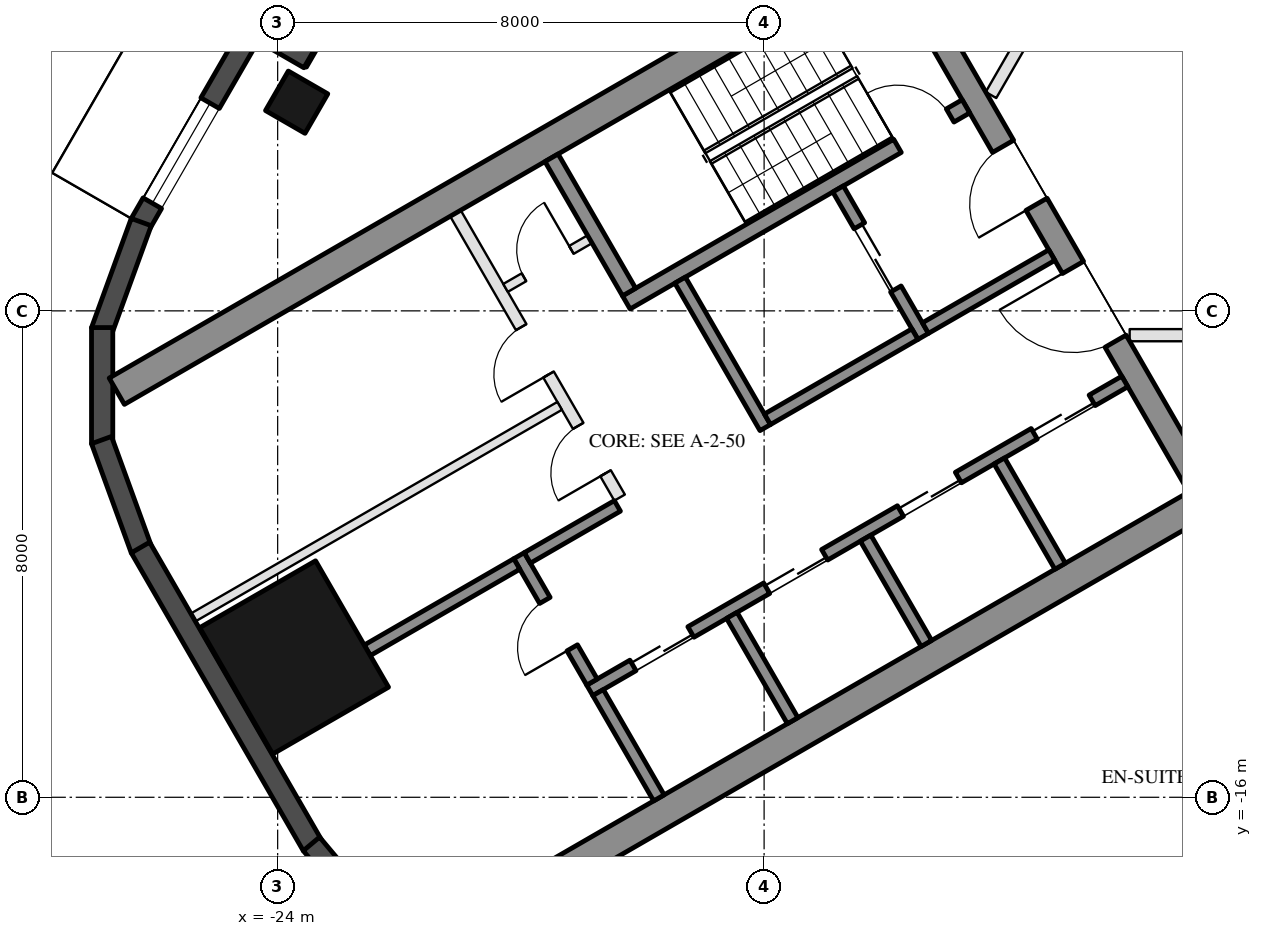
"""IFC4 building model, lengths in metres.
Left out: names, types, materials, properties, quantities, classifications, styles, units other than length and angle.
Written with IfcOpenShell. Run it as: python <this file> out.ifc"""

import sys

from ifc_helpers import new_model, si_unit, direction, frame, frame_2d, origin, origin_2d, place, context, subcontext, project, spatial, rectangle, hollow_rectangle, extrude, element, fill, save


model = new_model("IFC4")
c1 = context("Model", 3, precision=1e-05, world=origin(), true_north=direction((0.0, 1.0)))
c2 = subcontext(c1, "Body", "Model", "MODEL_VIEW")
j1 = project(units=[si_unit("LENGTHUNIT", "METRE"), si_unit("PLANEANGLEUNIT", "RADIAN")], contexts=[c1])
p1 = place(None, origin())
s1 = spatial("IfcSite", under=j1, at=p1, CompositionType="ELEMENT")
p2 = place(p1, origin())
s2 = spatial("IfcBuilding", under=s1, at=p2, CompositionType="ELEMENT")
p3 = place(p2, frame((0.0, 0.0, 216.9)))
s3 = spatial("IfcBuildingStorey", under=s2, at=p3, CompositionType="ELEMENT", Elevation=216.9)
p4 = place(p3, frame((-23.688, -4.568, 0.0), z_axis=(0.0, 0.0, 1.0), x_axis=(0.5, 0.866025403784, 0.0)))
e1 = element("IfcColumn", 1, at=p4, inside=s3, PredefinedType="COLUMN", context=c2, shape_type="SweptSolid", body=[
    extrude(hollow_rectangle(XDim=0.75, YDim=0.75, WallThickness=0.035, at=origin_2d()), origin(), (0.0, 0.0, 1.0), 3.7),
])
p5 = place(p3, frame((-23.729, -13.7, 0.0), z_axis=(0.0, 0.0, 1.0), x_axis=(-0.5, 0.866025403784, 0.0)))
e2 = element("IfcColumn", 2, at=p5, inside=s3, PredefinedType="COLUMN", context=c2, shape_type="SweptSolid", body=[
    extrude(hollow_rectangle(XDim=2.4, YDim=2.2, WallThickness=0.06, at=origin_2d()), origin(), (0.0, 0.0, 1.0), 3.7),
])
p6 = place(p3, frame((-20.309, 1.934, 0.0), z_axis=(0.0, 0.0, 1.0), x_axis=(-0.499992114976, -0.866029956157, 0.0)))
e3 = element("IfcWall", 3, at=p6, inside=s3, PredefinedType="SOLIDWALL", context=c2, shape_type="SweptSolid", body=[
    extrude(rectangle(XDim=6.74, YDim=0.35, at=frame_2d((3.37, 0.0))), origin(), (0.0, 0.0, 1.0), 3.55),
])
p7 = place(p6, frame((0.77, 0.0, 0.0)))
e4 = element("IfcOpeningElement", 4, at=p7, cuts=e3, PredefinedType="OPENING", context=c2, shape_type="SweptSolid", body=[
    extrude(rectangle(XDim=2.4, YDim=2.4, at=frame_2d((1.2, 1.2))), frame((0.0, 0.185, 0.0), z_axis=(0.0, -1.0, 0.0), x_axis=(1.0, 0.0, 0.0)), (0.0, 0.0, 1.0), 0.37),
])
p8 = place(p6, frame((3.47, 0.0, 0.3)))
e5 = element("IfcOpeningElement", 5, at=p8, cuts=e3, PredefinedType="OPENING", context=c2, shape_type="SweptSolid", body=[
    extrude(rectangle(XDim=2.9, YDim=2.65, at=frame_2d((1.45, 1.325))), frame((0.0, 0.185, 0.0), z_axis=(0.0, -1.0, 0.0), x_axis=(1.0, 0.0, 0.0)), (0.0, 0.0, 1.0), 0.37),
])
p9 = place(p3, frame((-23.481, -3.85, 0.0), z_axis=(0.0, 0.0, 1.0), x_axis=(-0.866092288191, 0.499884134912, 0.0)))
e6 = element("IfcWall", 6, at=p9, inside=s3, PredefinedType="SOLIDWALL", context=c2, shape_type="SweptSolid", body=[
    extrude(rectangle(XDim=1.22, YDim=0.35, at=frame_2d((0.61, 0.0))), origin(), (0.0, 0.0, 1.0), 3.55),
])
p10 = place(p3, frame((-24.299, -3.176, 0.0), z_axis=(0.0, 0.0, 1.0), x_axis=(-0.500028278809, -0.866009076391, 0.0)))
e7 = element("IfcWall", 7, at=p10, inside=s3, PredefinedType="SOLIDWALL", context=c2, shape_type="SweptSolid", body=[
    extrude(rectangle(XDim=3.916, YDim=0.35, at=frame_2d((1.958, 0.0))), origin(), (0.0, 0.0, 1.0), 3.55),
])
p11 = place(p10, frame((1.625, 0.0, 0.3)))
e8 = element("IfcOpeningElement", 8, at=p11, cuts=e7, PredefinedType="OPENING", context=c2, shape_type="SweptSolid", body=[
    extrude(rectangle(XDim=1.9, YDim=2.65, at=frame_2d((0.95, 1.325))), frame((0.0, 0.185, 0.0), z_axis=(0.0, -1.0, 0.0), x_axis=(1.0, 0.0, 0.0)), (0.0, 0.0, 1.0), 0.37),
])
for number, where, z_axis, x_axis in (
    (9, (-26.244, -6.54, 0.0), (0.0, 0.0, 1.0), (-0.342, -0.94, 0.0)),
    (10, (-26.886, -8.275, 0.0), (0.0, 0.0, 1.0), (0.0, -1.0, 0.0)),
    (11, (-26.897, -10.125, 0.0), (0.0, 0.0, 1.0), (0.342, -0.94, 0.0)),
):
    element("IfcWall", number, at=place(p3, frame(where, z_axis=z_axis, x_axis=x_axis)), inside=s3, PredefinedType="SOLIDWALL", context=c2, shape_type="SweptSolid", body=[
        extrude(rectangle(XDim=1.91, YDim=0.35, at=frame_2d((0.955, 0.0))), origin(), (0.0, 0.0, 1.0), 3.55),
    ])
p12 = place(p3, frame((-26.257, -11.893, 0.0), z_axis=(0.0, 0.0, 1.0), x_axis=(0.500018773155, -0.866014564827, 0.0)))
e12 = element("IfcWall", 12, at=p12, inside=s3, PredefinedType="SOLIDWALL", context=c2, shape_type="SweptSolid", body=[
    extrude(rectangle(XDim=5.658, YDim=0.35, at=frame_2d((2.829, 0.0))), origin(), (0.0, 0.0, 1.0), 3.55),
])
p13 = place(p3, frame((-23.445, -16.768, 0.0), z_axis=(0.0, 0.0, 1.0), x_axis=(0.642733291068, -0.76609001857, 0.0)))
e13 = element("IfcWall", 13, at=p13, inside=s3, PredefinedType="SOLIDWALL", context=c2, shape_type="SweptSolid", body=[
    extrude(rectangle(XDim=1.91, YDim=0.35, at=frame_2d((0.955, 0.0))), origin(), (0.0, 0.0, 1.0), 3.55),
])
for number, where, z_axis, x_axis in (
    (14, (-13.797, -1.903, 0.0), (0.0, 0.0, 1.0), (-0.866, -0.5, 0.0)),
    (15, (-8.547, -10.997, 0.0), (0.0, 0.0, 1.0), (-0.866, -0.5, 0.0)),
):
    element("IfcWall", number, at=place(p3, frame(where, z_axis=z_axis, x_axis=x_axis)), inside=s3, PredefinedType="SHEAR", context=c2, shape_type="SweptSolid", body=[
        extrude(rectangle(XDim=14.837, YDim=0.5, at=frame_2d((7.418, 0.0))), origin(), (0.0, 0.0, 1.0), 3.5),
    ])
p14 = place(p3, frame((-13.845, -2.22, 0.0), z_axis=(0.0, 0.0, 1.0), x_axis=(0.500004234368, -0.866022959057, 0.0)))
e16 = element("IfcWall", 16, at=p14, inside=s3, PredefinedType="SHEAR", context=c2, shape_type="SweptSolid", body=[
    extrude(rectangle(XDim=10.0, YDim=0.4, at=frame_2d((5.0, 0.0))), origin(), (0.0, 0.0, 1.0), 3.5),
])
p15 = place(p14, frame((3.55, 0.0, 0.0)))
e17 = element("IfcOpeningElement", 17, at=p15, cuts=e16, PredefinedType="OPENING", context=c2, shape_type="SweptSolid", body=[
    extrude(rectangle(XDim=1.1, YDim=2.1, at=frame_2d((0.55, 1.05))), frame((0.0, 0.21, 0.0), z_axis=(0.0, -1.0, 0.0), x_axis=(1.0, 0.0, 0.0)), (0.0, 0.0, 1.0), 0.42),
])
p16 = place(p14, frame((5.85, 0.0, 0.0)))
e18 = element("IfcOpeningElement", 18, at=p16, cuts=e16, PredefinedType="OPENING", context=c2, shape_type="SweptSolid", body=[
    extrude(rectangle(XDim=1.4, YDim=2.1, at=frame_2d((0.7, 1.05))), frame((0.0, 0.21, 0.0), z_axis=(0.0, -1.0, 0.0), x_axis=(1.0, 0.0, 0.0)), (0.0, 0.0, 1.0), 0.42),
])
p17 = place(p3, frame((-12.681, -4.636, 0.0), z_axis=(0.0, 0.0, 1.0), x_axis=(-0.866021702275, -0.500006411147, 0.0)))
e19 = element("IfcWall", 19, at=p17, inside=s3, PredefinedType="SHEAR", context=c2, shape_type="SweptSolid", body=[
    extrude(rectangle(XDim=6.45, YDim=0.25, at=frame_2d((3.225, 0.0))), origin(), (0.0, 0.0, 1.0), 3.5),
])
p18 = place(p17, frame((0.3, 0.0, 0.0)))
e20 = element("IfcOpeningElement", 20, at=p18, cuts=e19, PredefinedType="OPENING", context=c2, shape_type="SweptSolid", body=[
    extrude(rectangle(XDim=1.0, YDim=2.1, at=frame_2d((0.5, 1.05))), frame((0.0, 0.135, 0.0), z_axis=(0.0, -1.0, 0.0), x_axis=(1.0, 0.0, 0.0)), (0.0, 0.0, 1.0), 0.27),
])
p19 = place(p3, frame((-19.496, -5.482, 0.0), z_axis=(0.0, 0.0, 1.0), x_axis=(0.499990435942, -0.866030925526, 0.0)))
e21 = element("IfcWall", 21, at=p19, inside=s3, PredefinedType="SHEAR", context=c2, shape_type="SweptSolid", body=[
    extrude(rectangle(XDim=2.55, YDim=0.25, at=frame_2d((1.275, 0.0))), origin(), (0.0, 0.0, 1.0), 3.5),
])
p20 = place(p3, frame((-17.381, -7.495, 0.0), z_axis=(0.0, 0.0, 1.0), x_axis=(0.500011755427, -0.866018616679, 0.0)))
e22 = element("IfcWall", 22, at=p20, inside=s3, PredefinedType="SHEAR", context=c2, shape_type="SweptSolid", body=[
    extrude(rectangle(XDim=2.8, YDim=0.2, at=frame_2d((1.4, 0.0))), origin(), (0.0, 0.0, 1.0), 3.5),
])
p21 = place(p3, frame((-14.783, -5.995, 0.0), z_axis=(0.0, 0.0, 1.0), x_axis=(0.49994636267, -0.866056369097, 0.0)))
e23 = element("IfcWall", 23, at=p21, inside=s3, PredefinedType="SHEAR", context=c2, shape_type="SweptSolid", body=[
    extrude(rectangle(XDim=2.8, YDim=0.2, at=frame_2d((1.4, 0.0))), origin(), (0.0, 0.0, 1.0), 3.5),
])
p22 = place(p21, frame((0.7, 0.0, 0.0)))
e24 = element("IfcOpeningElement", 24, at=p22, cuts=e23, PredefinedType="OPENING", context=c2, shape_type="SweptSolid", body=[
    extrude(rectangle(XDim=1.2, YDim=2.1, at=frame_2d((0.6, 1.05))), frame((0.0, 0.11, 0.0), z_axis=(0.0, -1.0, 0.0), x_axis=(1.0, 0.0, 0.0)), (0.0, 0.0, 1.0), 0.22),
])
p23 = place(p3, frame((-13.52, -8.383, 0.0), z_axis=(0.0, 0.0, 1.0), x_axis=(-0.866034573852, -0.49998411664, 0.0)))
e25 = element("IfcWall", 25, at=p23, inside=s3, PredefinedType="SHEAR", context=c2, shape_type="SweptSolid", body=[
    extrude(rectangle(XDim=2.8, YDim=0.2, at=frame_2d((1.4, 0.0))), origin(), (0.0, 0.0, 1.0), 3.5),
])
p24 = place(p3, frame((-11.268, -7.083, 0.0), z_axis=(0.0, 0.0, 1.0), x_axis=(-0.866050077142, -0.499957262057, 0.0)))
e26 = element("IfcWall", 26, at=p24, inside=s3, PredefinedType="SHEAR", context=c2, shape_type="SweptSolid", body=[
    extrude(rectangle(XDim=2.4, YDim=0.2, at=frame_2d((1.2, 0.0))), origin(), (0.0, 0.0, 1.0), 3.5),
])
p25 = place(p3, frame((-10.068, -9.162, 0.0), z_axis=(0.0, 0.0, 1.0), x_axis=(-0.866032725843, -0.499987317609, 0.0)))
e27 = element("IfcWall", 27, at=p25, inside=s3, PredefinedType="SHEAR", context=c2, shape_type="SweptSolid", body=[
    extrude(rectangle(XDim=10.16, YDim=0.2, at=frame_2d((5.08, 0.0))), origin(), (0.0, 0.0, 1.0), 3.5),
])
p26 = place(p25, frame((0.62, 0.0, 0.0)))
e28 = element("IfcOpeningElement", 28, at=p26, cuts=e27, PredefinedType="OPENING", context=c2, shape_type="SweptSolid", body=[
    extrude(rectangle(XDim=1.1, YDim=2.1, at=frame_2d((0.55, 1.05))), frame((0.0, 0.11, 0.0), z_axis=(0.0, -1.0, 0.0), x_axis=(1.0, 0.0, 0.0)), (0.0, 0.0, 1.0), 0.22),
])
p27 = place(p25, frame((3.16, 0.0, 0.0)))
e29 = element("IfcOpeningElement", 29, at=p27, cuts=e27, PredefinedType="OPENING", context=c2, shape_type="SweptSolid", body=[
    extrude(rectangle(XDim=1.1, YDim=2.1, at=frame_2d((0.55, 1.05))), frame((0.0, 0.11, 0.0), z_axis=(0.0, -1.0, 0.0), x_axis=(1.0, 0.0, 0.0)), (0.0, 0.0, 1.0), 0.22),
])
p28 = place(p25, frame((5.7, 0.0, 0.0)))
e30 = element("IfcOpeningElement", 30, at=p28, cuts=e27, PredefinedType="OPENING", context=c2, shape_type="SweptSolid", body=[
    extrude(rectangle(XDim=1.1, YDim=2.1, at=frame_2d((0.55, 1.05))), frame((0.0, 0.11, 0.0), z_axis=(0.0, -1.0, 0.0), x_axis=(1.0, 0.0, 0.0)), (0.0, 0.0, 1.0), 0.22),
])
p29 = place(p25, frame((8.24, 0.0, 0.0)))
e31 = element("IfcOpeningElement", 31, at=p29, cuts=e27, PredefinedType="OPENING", context=c2, shape_type="SweptSolid", body=[
    extrude(rectangle(XDim=1.1, YDim=2.1, at=frame_2d((0.55, 1.05))), frame((0.0, 0.11, 0.0), z_axis=(0.0, -1.0, 0.0), x_axis=(1.0, 0.0, 0.0)), (0.0, 0.0, 1.0), 0.22),
])
p30 = place(p3, frame((-20.031, -12.026, 0.0), z_axis=(0.0, 0.0, 1.0), x_axis=(0.500033551112, -0.866006032174, 0.0)))
e32 = element("IfcWall", 32, at=p30, inside=s3, PredefinedType="SHEAR", context=c2, shape_type="SweptSolid", body=[
    extrude(rectangle(XDim=2.4, YDim=0.2, at=frame_2d((1.2, 0.0))), origin(), (0.0, 0.0, 1.0), 3.5),
])
p31 = place(p30, frame((0.85, 0.0, 0.0)))
e33 = element("IfcOpeningElement", 33, at=p31, cuts=e32, PredefinedType="OPENING", context=c2, shape_type="SweptSolid", body=[
    extrude(rectangle(XDim=0.9, YDim=2.1, at=frame_2d((0.45, 1.05))), frame((0.0, 0.11, 0.0), z_axis=(0.0, -1.0, 0.0), x_axis=(1.0, 0.0, 0.0)), (0.0, 0.0, 1.0), 0.22),
])
p32 = place(p3, frame((-18.413, -11.208, 0.0), z_axis=(0.0, 0.0, 1.0), x_axis=(-0.866038183914, -0.499977863513, 0.0)))
e34 = element("IfcWall", 34, at=p32, inside=s3, PredefinedType="SHEAR", context=c2, shape_type="SweptSolid", body=[
    extrude(rectangle(XDim=1.71, YDim=0.2, at=frame_2d((0.855, 0.0))), origin(), (0.0, 0.0, 1.0), 3.5),
])
for number, where, z_axis, x_axis in (
    (35, (-12.131, -10.468, 0.0), (0.0, 0.0, 1.0), (0.5, -0.866, 0.0)),
    (36, (-14.331, -11.738, 0.0), (0.0, 0.0, 1.0), (0.5, -0.866, 0.0)),
    (37, (-16.531, -13.008, 0.0), (0.0, 0.0, 1.0), (0.5, -0.866, 0.0)),
    (38, (-18.73, -14.278, 0.0), (0.0, 0.0, 1.0), (0.5, -0.866, 0.0)),
):
    element("IfcWall", number, at=place(p3, frame(where, z_axis=z_axis, x_axis=x_axis)), inside=s3, PredefinedType="SHEAR", context=c2, shape_type="SweptSolid", body=[
        extrude(rectangle(XDim=2.0, YDim=0.2, at=frame_2d((1.0, 0.0))), origin(), (0.0, 0.0, 1.0), 3.5),
    ])
p33 = place(p3, frame((-20.067, -12.163, 0.0), z_axis=(0.0, 0.0, 1.0), x_axis=(-0.866055327414, -0.49994816717, 0.0)))
e39 = element("IfcWall", 39, at=p33, inside=s3, PredefinedType="SHEAR", context=c2, shape_type="SweptSolid", body=[
    extrude(rectangle(XDim=2.84, YDim=0.2, at=frame_2d((1.42, 0.0))), origin(), (0.0, 0.0, 1.0), 3.5),
])
p34 = place(p3, frame((-21.076, -6.395, 0.0), z_axis=(0.0, 0.0, 1.0), x_axis=(0.50001468107, -0.866016927499, 0.0)))
e40 = element("IfcWall", 40, at=p34, inside=s3, PredefinedType="PARTITIONING", context=c2, shape_type="SweptSolid", body=[
    extrude(rectangle(XDim=5.4, YDim=0.2, at=frame_2d((2.7, 0.0))), origin(), (0.0, 0.0, 1.0), 3.5),
])
p35 = place(p34, frame((2.163, 0.0, 0.0)))
e41 = element("IfcOpeningElement", 41, at=p35, cuts=e40, PredefinedType="OPENING", context=c2, shape_type="SweptSolid", body=[
    extrude(rectangle(XDim=0.9, YDim=2.1, at=frame_2d((0.45, 1.05))), frame((0.0, 0.11, 0.0), z_axis=(0.0, -1.0, 0.0), x_axis=(1.0, 0.0, 0.0)), (0.0, 0.0, 1.0), 0.22),
])
p36 = place(p34, frame((4.038, 0.0, 0.0)))
e42 = element("IfcOpeningElement", 42, at=p36, cuts=e40, PredefinedType="OPENING", context=c2, shape_type="SweptSolid", body=[
    extrude(rectangle(XDim=0.9, YDim=2.1, at=frame_2d((0.45, 1.05))), frame((0.0, 0.11, 0.0), z_axis=(0.0, -1.0, 0.0), x_axis=(1.0, 0.0, 0.0)), (0.0, 0.0, 1.0), 0.22),
])
p37 = place(p3, frame((-18.866, -6.822, 0.0), z_axis=(0.0, 0.0, 1.0), x_axis=(-0.866028054938, -0.499995408039, 0.0)))
e43 = element("IfcWall", 43, at=p37, inside=s3, PredefinedType="PARTITIONING", context=c2, shape_type="SweptSolid", body=[
    extrude(rectangle(XDim=1.6, YDim=0.15, at=frame_2d((0.8, 0.0))), origin(), (0.0, 0.0, 1.0), 3.5),
])
p38 = place(p37, frame((0.35, 0.0, 0.0)))
e44 = element("IfcOpeningElement", 44, at=p38, cuts=e43, PredefinedType="OPENING", context=c2, shape_type="SweptSolid", body=[
    extrude(rectangle(XDim=0.9, YDim=2.1, at=frame_2d((0.45, 1.05))), frame((0.0, 0.085, 0.0), z_axis=(0.0, -1.0, 0.0), x_axis=(1.0, 0.0, 0.0)), (0.0, 0.0, 1.0), 0.17),
])
p39 = place(p3, frame((-19.363, -9.562, 0.0), z_axis=(0.0, 0.0, 1.0), x_axis=(-0.866016523273, -0.500015381182, 0.0)))
e45 = element("IfcWall", 45, at=p39, inside=s3, PredefinedType="PARTITIONING", context=c2, shape_type="SweptSolid", body=[
    extrude(rectangle(XDim=6.95, YDim=0.15, at=frame_2d((3.475, 0.0))), origin(), (0.0, 0.0, 1.0), 3.5),
])
p40 = place(p3, frame((-6.2, -8.4, 0.0), z_axis=(0.0, 0.0, 1.0), x_axis=(-1.0, 0.0, 0.0)))
e46 = element("IfcWall", 46, at=p40, inside=s3, PredefinedType="PARTITIONING", context=c2, shape_type="SweptSolid", body=[
    extrude(rectangle(XDim=3.788, YDim=0.2, at=frame_2d((1.894, 0.0))), origin(), (0.0, 0.0, 1.0), 2.95),
])
p41 = place(p40, frame((1.394, 0.0, 0.0)))
e47 = element("IfcOpeningElement", 47, at=p41, cuts=e46, PredefinedType="OPENING", context=c2, shape_type="SweptSolid", body=[
    extrude(rectangle(XDim=1.0, YDim=2.1, at=frame_2d((0.5, 1.05))), frame((0.0, 0.11, 0.0), z_axis=(0.0, -1.0, 0.0), x_axis=(1.0, 0.0, 0.0)), (0.0, 0.0, 1.0), 0.22),
])
p42 = place(p3, frame((-12.269, -4.45, 0.0), z_axis=(0.0, 0.0, 1.0), x_axis=(0.499998569178, 0.866026229868, 0.0)))
e48 = element("IfcWall", 48, at=p42, inside=s3, PredefinedType="PARTITIONING", context=c2, shape_type="SweptSolid", body=[
    extrude(rectangle(XDim=4.388, YDim=0.2, at=frame_2d((2.194, 0.0))), origin(), (0.0, 0.0, 1.0), 2.95),
])
p43 = place(p42, frame((1.694, 0.0, 0.0)))
e49 = element("IfcOpeningElement", 49, at=p43, cuts=e48, PredefinedType="OPENING", context=c2, shape_type="SweptSolid", body=[
    extrude(rectangle(XDim=1.0, YDim=2.1, at=frame_2d((0.5, 1.05))), frame((0.0, 0.11, 0.0), z_axis=(0.0, -1.0, 0.0), x_axis=(1.0, 0.0, 0.0)), (0.0, 0.0, 1.0), 0.22),
])
p44 = place(p11, origin())
e50 = element("IfcWindow", 50, at=p44, inside=s3, PartitioningType="SINGLE_PANEL", PredefinedType="WINDOW", context=c2, shape_type="SweptSolid", body=[
    extrude(rectangle(XDim=1.9, YDim=2.65, at=frame_2d((0.95, 1.325))), frame((0.0, 0.03, 0.0), z_axis=(0.0, -1.0, 0.0), x_axis=(1.0, 0.0, 0.0)), (0.0, 0.0, 1.0), 0.06),
])
fill(e8, e50)
p45 = place(p22, origin())
e51 = element("IfcDoor", 51, at=p45, inside=s3, OperationType="DOUBLE_DOOR_SLIDING", PredefinedType="DOOR", context=c2, shape_type="SweptSolid", body=[
    extrude(rectangle(XDim=1.2, YDim=2.1, at=frame_2d((0.6, 1.05))), frame((0.0, 0.025, 0.0), z_axis=(0.0, -1.0, 0.0), x_axis=(1.0, 0.0, 0.0)), (0.0, 0.0, 1.0), 0.05),
])
fill(e24, e51)
p46 = place(p38, frame((0.9, 0.0, 0.0), z_axis=(0.0, 0.0, 1.0), x_axis=(-1.0, 0.0, 0.0)))
e52 = element("IfcDoor", 52, at=p46, inside=s3, OperationType="SINGLE_SWING_RIGHT", PredefinedType="DOOR", context=c2, shape_type="SweptSolid", body=[
    extrude(rectangle(XDim=0.9, YDim=2.1, at=frame_2d((0.45, 1.05))), frame((0.0, 0.025, 0.0), z_axis=(0.0, -1.0, 0.0), x_axis=(1.0, 0.0, 0.0)), (0.0, 0.0, 1.0), 0.05),
])
fill(e44, e52)
p47 = place(p26, origin())
e53 = element("IfcDoor", 53, at=p47, inside=s3, OperationType="DOUBLE_DOOR_SLIDING", PredefinedType="DOOR", context=c2, shape_type="SweptSolid", body=[
    extrude(rectangle(XDim=1.1, YDim=2.1, at=frame_2d((0.55, 1.05))), frame((0.0, 0.025, 0.0), z_axis=(0.0, -1.0, 0.0), x_axis=(1.0, 0.0, 0.0)), (0.0, 0.0, 1.0), 0.05),
])
fill(e28, e53)
p48 = place(p27, origin())
e54 = element("IfcDoor", 54, at=p48, inside=s3, OperationType="DOUBLE_DOOR_SLIDING", PredefinedType="DOOR", context=c2, shape_type="SweptSolid", body=[
    extrude(rectangle(XDim=1.1, YDim=2.1, at=frame_2d((0.55, 1.05))), frame((0.0, 0.025, 0.0), z_axis=(0.0, -1.0, 0.0), x_axis=(1.0, 0.0, 0.0)), (0.0, 0.0, 1.0), 0.05),
])
fill(e29, e54)
p49 = place(p28, origin())
e55 = element("IfcDoor", 55, at=p49, inside=s3, OperationType="DOUBLE_DOOR_SLIDING", PredefinedType="DOOR", context=c2, shape_type="SweptSolid", body=[
    extrude(rectangle(XDim=1.1, YDim=2.1, at=frame_2d((0.55, 1.05))), frame((0.0, 0.025, 0.0), z_axis=(0.0, -1.0, 0.0), x_axis=(1.0, 0.0, 0.0)), (0.0, 0.0, 1.0), 0.05),
])
fill(e30, e55)
p50 = place(p29, origin())
e56 = element("IfcDoor", 56, at=p50, inside=s3, OperationType="DOUBLE_DOOR_SLIDING", PredefinedType="DOOR", context=c2, shape_type="SweptSolid", body=[
    extrude(rectangle(XDim=1.1, YDim=2.1, at=frame_2d((0.55, 1.05))), frame((0.0, 0.025, 0.0), z_axis=(0.0, -1.0, 0.0), x_axis=(1.0, 0.0, 0.0)), (0.0, 0.0, 1.0), 0.05),
])
fill(e31, e56)
p51 = place(p31, frame((0.9, 0.0, 0.0), z_axis=(0.0, 0.0, 1.0), x_axis=(-1.0, 0.0, 0.0)))
e57 = element("IfcDoor", 57, at=p51, inside=s3, OperationType="SINGLE_SWING_LEFT", PredefinedType="DOOR", context=c2, shape_type="SweptSolid", body=[
    extrude(rectangle(XDim=0.9, YDim=2.1, at=frame_2d((0.45, 1.05))), frame((0.0, 0.025, 0.0), z_axis=(0.0, -1.0, 0.0), x_axis=(1.0, 0.0, 0.0)), (0.0, 0.0, 1.0), 0.05),
])
fill(e33, e57)
p52 = place(p35, frame((0.9, 0.0, 0.0), z_axis=(0.0, 0.0, 1.0), x_axis=(-1.0, 0.0, 0.0)))
e58 = element("IfcDoor", 58, at=p52, inside=s3, OperationType="SINGLE_SWING_LEFT", PredefinedType="DOOR", context=c2, shape_type="SweptSolid", body=[
    extrude(rectangle(XDim=0.9, YDim=2.1, at=frame_2d((0.45, 1.05))), frame((0.0, 0.025, 0.0), z_axis=(0.0, -1.0, 0.0), x_axis=(1.0, 0.0, 0.0)), (0.0, 0.0, 1.0), 0.05),
])
fill(e41, e58)
p53 = place(p36, frame((0.9, 0.0, 0.0), z_axis=(0.0, 0.0, 1.0), x_axis=(-1.0, 0.0, 0.0)))
e59 = element("IfcDoor", 59, at=p53, inside=s3, OperationType="SINGLE_SWING_LEFT", PredefinedType="DOOR", context=c2, shape_type="SweptSolid", body=[
    extrude(rectangle(XDim=0.9, YDim=2.1, at=frame_2d((0.45, 1.05))), frame((0.0, 0.025, 0.0), z_axis=(0.0, -1.0, 0.0), x_axis=(1.0, 0.0, 0.0)), (0.0, 0.0, 1.0), 0.05),
])
fill(e42, e59)
p54 = place(p15, frame((1.1, 0.0, 0.0), z_axis=(0.0, 0.0, 1.0), x_axis=(-1.0, 0.0, 0.0)))
e60 = element("IfcDoor", 60, at=p54, inside=s3, OperationType="SINGLE_SWING_LEFT", PredefinedType="DOOR", context=c2, shape_type="SweptSolid", body=[
    extrude(rectangle(XDim=1.1, YDim=2.1, at=frame_2d((0.55, 1.05))), frame((0.0, 0.025, 0.0), z_axis=(0.0, -1.0, 0.0), x_axis=(1.0, 0.0, 0.0)), (0.0, 0.0, 1.0), 0.05),
])
fill(e17, e60)
p55 = place(p16, frame((1.4, 0.0, 0.0), z_axis=(0.0, 0.0, 1.0), x_axis=(-1.0, 0.0, 0.0)))
e61 = element("IfcDoor", 61, at=p55, inside=s3, OperationType="DOUBLE_DOOR_SINGLE_SWING", PredefinedType="DOOR", context=c2, shape_type="SweptSolid", body=[
    extrude(rectangle(XDim=1.4, YDim=2.1, at=frame_2d((0.7, 1.05))), frame((0.0, 0.025, 0.0), z_axis=(0.0, -1.0, 0.0), x_axis=(1.0, 0.0, 0.0)), (0.0, 0.0, 1.0), 0.05),
])
fill(e18, e61)
p56 = place(p18, frame((1.0, 0.0, 0.0), z_axis=(0.0, 0.0, 1.0), x_axis=(-1.0, 0.0, 0.0)))
e62 = element("IfcDoor", 62, at=p56, inside=s3, OperationType="SINGLE_SWING_LEFT", PredefinedType="DOOR", context=c2, shape_type="SweptSolid", body=[
    extrude(rectangle(XDim=1.0, YDim=2.1, at=frame_2d((0.5, 1.05))), frame((0.0, 0.025, 0.0), z_axis=(0.0, -1.0, 0.0), x_axis=(1.0, 0.0, 0.0)), (0.0, 0.0, 1.0), 0.05),
])
fill(e20, e62)
save(model, sys.argv[1])
